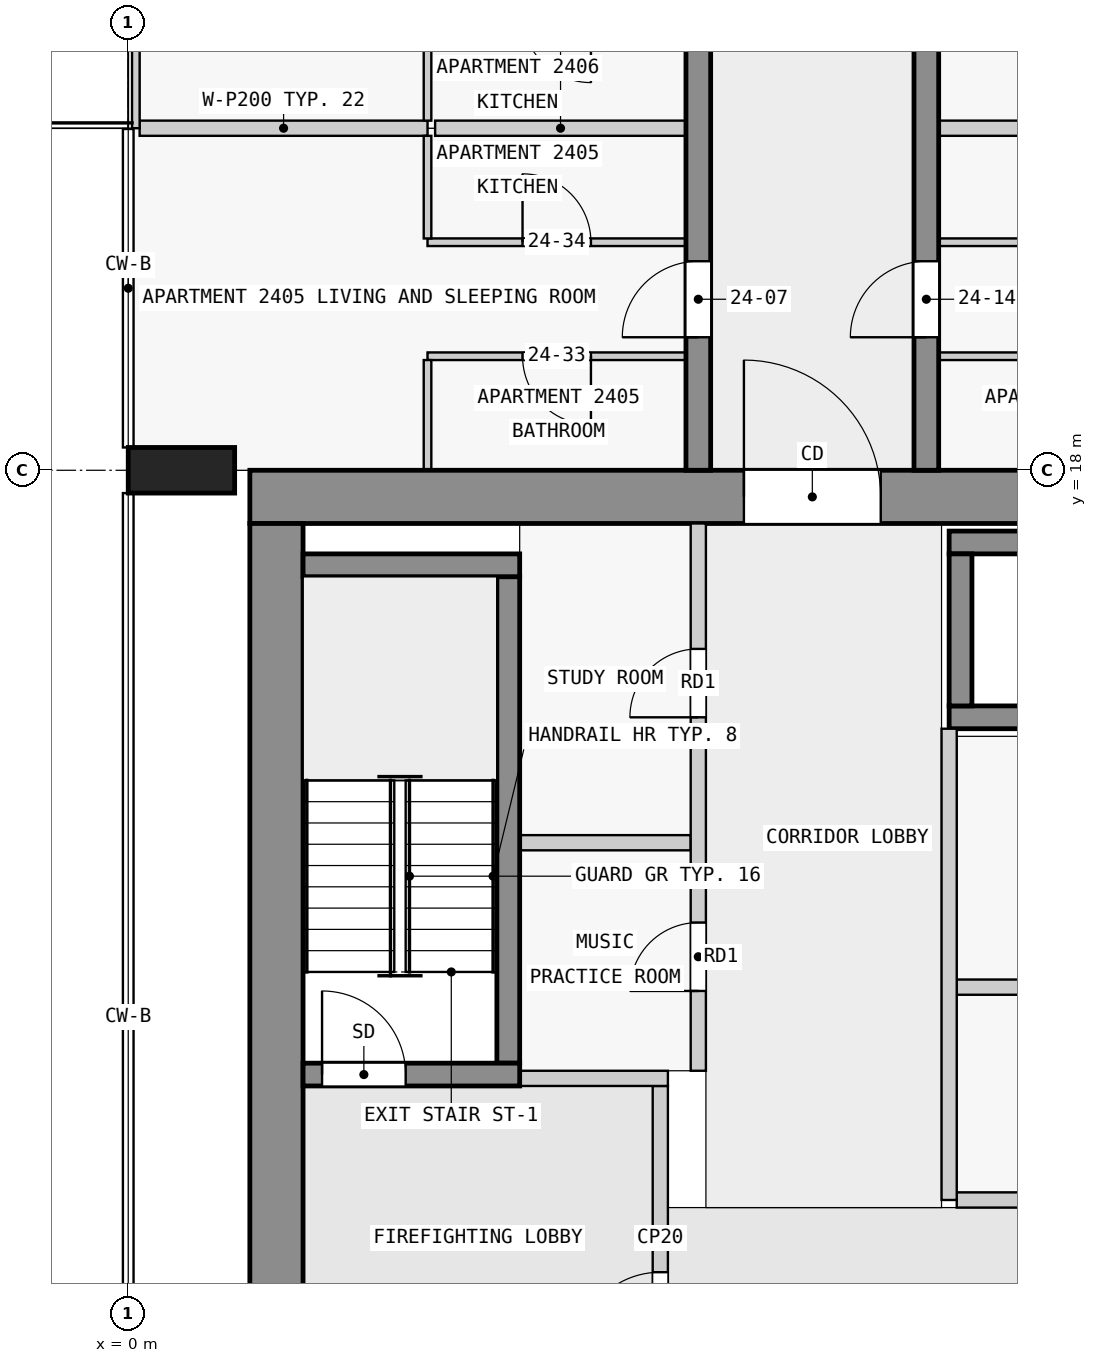
"""IFC4 building model, lengths in metres.
Left out: names, types, materials, properties, quantities, classifications, styles, units other than length and angle.
Written with IfcOpenShell. Run it as: python <this file> out.ifc"""

import sys

from ifc_helpers import new_model, si_unit, direction, frame, frame_2d, origin, origin_2d, place, context, subcontext, project, spatial, rectangle, extrude, element, fill, save


model = new_model("IFC4")
c1 = context("Model", 3, precision=1e-05, world=origin(), true_north=direction((0.0, 1.0)))
c2 = subcontext(c1, "Body", "Model", "MODEL_VIEW")
j1 = project(units=[si_unit("LENGTHUNIT", "METRE"), si_unit("PLANEANGLEUNIT", "RADIAN")], contexts=[c1])
p1 = place(None, origin())
s1 = spatial("IfcSite", under=j1, at=p1, CompositionType="ELEMENT")
p2 = place(p1, origin())
s2 = spatial("IfcBuilding", under=s1, at=p2, CompositionType="ELEMENT")
p3 = place(p2, frame((0.0, 0.0, 95.8)))
s3 = spatial("IfcBuildingStorey", under=s2, at=p3, CompositionType="ELEMENT", Elevation=95.8)
p4 = place(p3, frame((0.7, 18.0, 0.0), z_axis=(0.0, 0.0, 1.0), x_axis=(0.0, 1.0, 0.0)))
e1 = element("IfcColumn", 1, at=p4, inside=s3, PredefinedType="COLUMN", context=c2, shape_type="SweptSolid", body=[
    extrude(rectangle(XDim=0.6, YDim=1.4, at=origin_2d()), origin(), (0.0, 0.0, 1.0), 3.5),
])
p5 = place(p3, frame((1.6, 17.65, 0.0), z_axis=(0.0, 0.0, 1.0), x_axis=(1.0, 0.0, 0.0)))
e2 = element("IfcWall", 2, at=p5, inside=s3, PredefinedType="SHEAR", context=c2, shape_type="SweptSolid", body=[
    extrude(rectangle(XDim=20.9, YDim=0.7, at=frame_2d((10.45, 0.0))), origin(), (0.0, 0.0, 1.0), 3.25),
])
p6 = place(p5, frame((6.5, 0.0, 0.0)))
e3 = element("IfcOpeningElement", 3, at=p6, cuts=e2, PredefinedType="OPENING", context=c2, shape_type="SweptSolid", body=[
    extrude(rectangle(XDim=1.8, YDim=2.1, at=frame_2d((0.9, 1.05))), frame((0.0, 0.36, 0.0), z_axis=(0.0, -1.0, 0.0), x_axis=(1.0, 0.0, 0.0)), (0.0, 0.0, 1.0), 0.72),
])
p7 = place(p3, frame((1.95, 2.5, 0.0), z_axis=(0.0, 0.0, 1.0), x_axis=(0.0, 1.0, 0.0)))
e4 = element("IfcWall", 4, at=p7, inside=s3, PredefinedType="SHEAR", context=c2, shape_type="SweptSolid", body=[
    extrude(rectangle(XDim=14.8, YDim=0.7, at=frame_2d((7.4, 0.0))), origin(), (0.0, 0.0, 1.0), 3.25),
])
p8 = place(p3, frame((2.3, 10.05, 0.0), z_axis=(0.0, 0.0, 1.0), x_axis=(1.0, 0.0, 0.0)))
e5 = element("IfcWall", 5, at=p8, inside=s3, PredefinedType="SHEAR", context=c2, shape_type="SweptSolid", body=[
    extrude(rectangle(XDim=2.85, YDim=0.3, at=frame_2d((1.425, 0.0))), origin(), (0.0, 0.0, 1.0), 3.25),
])
p9 = place(p8, frame((0.25, 0.0, 0.0)))
e6 = element("IfcOpeningElement", 6, at=p9, cuts=e5, PredefinedType="OPENING", context=c2, shape_type="SweptSolid", body=[
    extrude(rectangle(XDim=1.1, YDim=2.1, at=frame_2d((0.55, 1.05))), frame((0.0, 0.16, 0.0), z_axis=(0.0, -1.0, 0.0), x_axis=(1.0, 0.0, 0.0)), (0.0, 0.0, 1.0), 0.32),
])
p10 = place(p3, frame((5.0, 10.2, 0.0), z_axis=(0.0, 0.0, 1.0), x_axis=(0.0, 1.0, 0.0)))
e7 = element("IfcWall", 7, at=p10, inside=s3, PredefinedType="SHEAR", context=c2, shape_type="SweptSolid", body=[
    extrude(rectangle(XDim=6.4, YDim=0.3, at=frame_2d((3.2, 0.0))), origin(), (0.0, 0.0, 1.0), 3.25),
])
p11 = place(p3, frame((2.3, 16.75, 0.0), z_axis=(0.0, 0.0, 1.0), x_axis=(1.0, 0.0, 0.0)))
e8 = element("IfcWall", 8, at=p11, inside=s3, PredefinedType="SHEAR", context=c2, shape_type="SweptSolid", body=[
    extrude(rectangle(XDim=2.85, YDim=0.3, at=frame_2d((1.425, 0.0))), origin(), (0.0, 0.0, 1.0), 3.25),
])
for number, where, z_axis, x_axis in (
    (9, (10.8, 17.05, 0.0), (0.0, 0.0, 1.0), (1.0, 0.0, 0.0)),
    (10, (10.8, 14.75, 0.0), (0.0, 0.0, 1.0), (1.0, 0.0, 0.0)),
):
    element("IfcWall", number, at=place(p3, frame(where, z_axis=z_axis, x_axis=x_axis)), inside=s3, PredefinedType="SHEAR", context=c2, shape_type="SweptSolid", body=[
        extrude(rectangle(XDim=7.8, YDim=0.3, at=frame_2d((3.9, 0.0))), origin(), (0.0, 0.0, 1.0), 3.25),
    ])
p12 = place(p3, frame((10.95, 14.9, 0.0), z_axis=(0.0, 0.0, 1.0), x_axis=(0.0, 1.0, 0.0)))
e11 = element("IfcWall", 11, at=p12, inside=s3, PredefinedType="SHEAR", context=c2, shape_type="SweptSolid", body=[
    extrude(rectangle(XDim=2.0, YDim=0.3, at=frame_2d((1.0, 0.0))), origin(), (0.0, 0.0, 1.0), 3.25),
])
p13 = place(p3, frame((7.5, 18.0, 0.0), z_axis=(0.0, 0.0, 1.0), x_axis=(0.0, 1.0, 0.0)))
e12 = element("IfcWall", 12, at=p13, inside=s3, PredefinedType="SHEAR", context=c2, shape_type="SweptSolid", body=[
    extrude(rectangle(XDim=27.0, YDim=0.325, at=frame_2d((13.5, 0.0))), origin(), (0.0, 0.0, 1.0), 3.25),
])
p14 = place(p13, frame((1.75, 0.0, 0.0)))
e13 = element("IfcOpeningElement", 13, at=p14, cuts=e12, PredefinedType="OPENING", context=c2, shape_type="SweptSolid", body=[
    extrude(rectangle(XDim=1.0, YDim=2.1, at=frame_2d((0.5, 1.05))), frame((0.0, 0.172, 0.0), z_axis=(0.0, -1.0, 0.0), x_axis=(1.0, 0.0, 0.0)), (0.0, 0.0, 1.0), 0.345),
])
p15 = place(p13, frame((6.25, 0.0, 0.0)))
e14 = element("IfcOpeningElement", 14, at=p15, cuts=e12, PredefinedType="OPENING", context=c2, shape_type="SweptSolid", body=[
    extrude(rectangle(XDim=1.0, YDim=2.1, at=frame_2d((0.5, 1.05))), frame((0.0, 0.172, 0.0), z_axis=(0.0, -1.0, 0.0), x_axis=(1.0, 0.0, 0.0)), (0.0, 0.0, 1.0), 0.345),
])
p16 = place(p13, frame((10.85, 0.0, 0.0)))
e15 = element("IfcOpeningElement", 15, at=p16, cuts=e12, PredefinedType="OPENING", context=c2, shape_type="SweptSolid", body=[
    extrude(rectangle(XDim=0.9, YDim=2.1, at=frame_2d((0.45, 1.05))), frame((0.0, 0.172, 0.0), z_axis=(0.0, -1.0, 0.0), x_axis=(1.0, 0.0, 0.0)), (0.0, 0.0, 1.0), 0.345),
])
p17 = place(p13, frame((15.25, 0.0, 0.0)))
e16 = element("IfcOpeningElement", 16, at=p17, cuts=e12, PredefinedType="OPENING", context=c2, shape_type="SweptSolid", body=[
    extrude(rectangle(XDim=1.0, YDim=2.1, at=frame_2d((0.5, 1.05))), frame((0.0, 0.172, 0.0), z_axis=(0.0, -1.0, 0.0), x_axis=(1.0, 0.0, 0.0)), (0.0, 0.0, 1.0), 0.345),
])
p18 = place(p13, frame((19.85, 0.0, 0.0)))
e17 = element("IfcOpeningElement", 17, at=p18, cuts=e12, PredefinedType="OPENING", context=c2, shape_type="SweptSolid", body=[
    extrude(rectangle(XDim=0.9, YDim=2.1, at=frame_2d((0.45, 1.05))), frame((0.0, 0.172, 0.0), z_axis=(0.0, -1.0, 0.0), x_axis=(1.0, 0.0, 0.0)), (0.0, 0.0, 1.0), 0.345),
])
p19 = place(p13, frame((23.25, 0.0, 0.0)))
e18 = element("IfcOpeningElement", 18, at=p19, cuts=e12, PredefinedType="OPENING", context=c2, shape_type="SweptSolid", body=[
    extrude(rectangle(XDim=0.9, YDim=2.1, at=frame_2d((0.45, 1.05))), frame((0.0, 0.172, 0.0), z_axis=(0.0, -1.0, 0.0), x_axis=(1.0, 0.0, 0.0)), (0.0, 0.0, 1.0), 0.345),
])
p20 = place(p13, frame((25.45, 0.0, 0.0)))
e19 = element("IfcOpeningElement", 19, at=p20, cuts=e12, PredefinedType="OPENING", context=c2, shape_type="SweptSolid", body=[
    extrude(rectangle(XDim=1.0, YDim=2.1, at=frame_2d((0.5, 1.05))), frame((0.0, 0.172, 0.0), z_axis=(0.0, -1.0, 0.0), x_axis=(1.0, 0.0, 0.0)), (0.0, 0.0, 1.0), 0.345),
])
p21 = place(p3, frame((10.5, 18.0, 0.0), z_axis=(0.0, 0.0, 1.0), x_axis=(0.0, 1.0, 0.0)))
e20 = element("IfcWall", 20, at=p21, inside=s3, PredefinedType="SHEAR", context=c2, shape_type="SweptSolid", body=[
    extrude(rectangle(XDim=27.0, YDim=0.325, at=frame_2d((13.5, 0.0))), origin(), (0.0, 0.0, 1.0), 3.25),
])
p22 = place(p21, frame((1.75, 0.0, 0.0)))
e21 = element("IfcOpeningElement", 21, at=p22, cuts=e20, PredefinedType="OPENING", context=c2, shape_type="SweptSolid", body=[
    extrude(rectangle(XDim=1.0, YDim=2.1, at=frame_2d((0.5, 1.05))), frame((0.0, 0.172, 0.0), z_axis=(0.0, -1.0, 0.0), x_axis=(1.0, 0.0, 0.0)), (0.0, 0.0, 1.0), 0.345),
])
p23 = place(p21, frame((6.25, 0.0, 0.0)))
e22 = element("IfcOpeningElement", 22, at=p23, cuts=e20, PredefinedType="OPENING", context=c2, shape_type="SweptSolid", body=[
    extrude(rectangle(XDim=1.0, YDim=2.1, at=frame_2d((0.5, 1.05))), frame((0.0, 0.172, 0.0), z_axis=(0.0, -1.0, 0.0), x_axis=(1.0, 0.0, 0.0)), (0.0, 0.0, 1.0), 0.345),
])
p24 = place(p21, frame((13.05, 0.0, 0.0)))
e23 = element("IfcOpeningElement", 23, at=p24, cuts=e20, PredefinedType="OPENING", context=c2, shape_type="SweptSolid", body=[
    extrude(rectangle(XDim=1.0, YDim=2.1, at=frame_2d((0.5, 1.05))), frame((0.0, 0.172, 0.0), z_axis=(0.0, -1.0, 0.0), x_axis=(1.0, 0.0, 0.0)), (0.0, 0.0, 1.0), 0.345),
])
p25 = place(p21, frame((21.35, 0.0, 0.0)))
e24 = element("IfcOpeningElement", 24, at=p25, cuts=e20, PredefinedType="OPENING", context=c2, shape_type="SweptSolid", body=[
    extrude(rectangle(XDim=1.0, YDim=2.1, at=frame_2d((0.5, 1.05))), frame((0.0, 0.172, 0.0), z_axis=(0.0, -1.0, 0.0), x_axis=(1.0, 0.0, 0.0)), (0.0, 0.0, 1.0), 0.345),
])
p26 = place(p3, frame((0.1, 22.5, 0.0), z_axis=(0.0, 0.0, 1.0), x_axis=(0.0, 1.0, 0.0)))
e25 = element("IfcWall", 25, at=p26, inside=s3, PredefinedType="STANDARD", context=c2, shape_type="SweptSolid", body=[
    extrude(rectangle(XDim=4.5, YDim=0.1, at=frame_2d((2.25, 0.0))), origin(), (0.0, 0.0, 1.0), 3.25),
])
p27 = place(p26, frame((1.05, 0.0, 0.0)))
e26 = element("IfcOpeningElement", 26, at=p27, cuts=e25, PredefinedType="OPENING", context=c2, shape_type="SweptSolid", body=[
    extrude(rectangle(XDim=2.4, YDim=2.4, at=frame_2d((1.2, 1.2))), frame((0.0, 0.06, 0.0), z_axis=(0.0, -1.0, 0.0), x_axis=(1.0, 0.0, 0.0)), (0.0, 0.0, 1.0), 0.12),
])
p28 = place(p3, frame((7.0, 5.9, 0.0), z_axis=(0.0, 0.0, 1.0), x_axis=(0.0, 1.0, 0.0)))
e27 = element("IfcWall", 27, at=p28, inside=s3, PredefinedType="PARTITIONING", context=c2, shape_type="SweptSolid", body=[
    extrude(rectangle(XDim=4.0, YDim=0.2, at=frame_2d((2.0, 0.0))), origin(), (0.0, 0.0, 1.0), 3.25),
])
p29 = place(p28, frame((0.45, 0.0, 0.0)))
e28 = element("IfcOpeningElement", 28, at=p29, cuts=e27, PredefinedType="OPENING", context=c2, shape_type="SweptSolid", body=[
    extrude(rectangle(XDim=1.1, YDim=2.1, at=frame_2d((0.55, 1.05))), frame((0.0, 0.11, 0.0), z_axis=(0.0, -1.0, 0.0), x_axis=(1.0, 0.0, 0.0)), (0.0, 0.0, 1.0), 0.22),
])
p30 = place(p3, frame((5.15, 10.0, 0.0), z_axis=(0.0, 0.0, 1.0), x_axis=(1.0, 0.0, 0.0)))
e29 = element("IfcWall", 29, at=p30, inside=s3, PredefinedType="PARTITIONING", context=c2, shape_type="SweptSolid", body=[
    extrude(rectangle(XDim=1.95, YDim=0.2, at=frame_2d((0.975, 0.0))), origin(), (0.0, 0.0, 1.0), 3.25),
])
p31 = place(p3, frame((10.8, 8.4, 0.0), z_axis=(0.0, 0.0, 1.0), x_axis=(0.0, 1.0, 0.0)))
e30 = element("IfcWall", 30, at=p31, inside=s3, PredefinedType="PARTITIONING", context=c2, shape_type="SweptSolid", body=[
    extrude(rectangle(XDim=6.2, YDim=0.2, at=frame_2d((3.1, 0.0))), origin(), (0.0, 0.0, 1.0), 3.25),
])
for number, where, z_axis, x_axis in (
    (31, (10.9, 8.4, 0.0), (0.0, 0.0, 1.0), (1.0, 0.0, 0.0)),
    (32, (10.9, 11.2, 0.0), (0.0, 0.0, 1.0), (1.0, 0.0, 0.0)),
):
    element("IfcWall", number, at=place(p3, frame(where, z_axis=z_axis, x_axis=x_axis)), inside=s3, PredefinedType="PARTITIONING", context=c2, shape_type="SweptSolid", body=[
        extrude(rectangle(XDim=7.4, YDim=0.2, at=frame_2d((3.7, 0.0))), origin(), (0.0, 0.0, 1.0), 3.25),
    ])
p32 = place(p3, frame((7.5, 10.1, 0.0), z_axis=(0.0, 0.0, 1.0), x_axis=(0.0, 1.0, 0.0)))
e33 = element("IfcWall", 33, at=p32, inside=s3, PredefinedType="PARTITIONING", context=c2, shape_type="SweptSolid", body=[
    extrude(rectangle(XDim=7.2, YDim=0.2, at=frame_2d((3.6, 0.0))), origin(), (0.0, 0.0, 1.0), 3.25),
])
p33 = place(p32, frame((1.05, 0.0, 0.0)))
e34 = element("IfcOpeningElement", 34, at=p33, cuts=e33, PredefinedType="OPENING", context=c2, shape_type="SweptSolid", body=[
    extrude(rectangle(XDim=0.9, YDim=2.1, at=frame_2d((0.45, 1.05))), frame((0.0, 0.11, 0.0), z_axis=(0.0, -1.0, 0.0), x_axis=(1.0, 0.0, 0.0)), (0.0, 0.0, 1.0), 0.22),
])
p34 = place(p32, frame((4.65, 0.0, 0.0)))
e35 = element("IfcOpeningElement", 35, at=p34, cuts=e33, PredefinedType="OPENING", context=c2, shape_type="SweptSolid", body=[
    extrude(rectangle(XDim=0.9, YDim=2.1, at=frame_2d((0.45, 1.05))), frame((0.0, 0.11, 0.0), z_axis=(0.0, -1.0, 0.0), x_axis=(1.0, 0.0, 0.0)), (0.0, 0.0, 1.0), 0.22),
])
p35 = place(p3, frame((5.15, 13.1, 0.0), z_axis=(0.0, 0.0, 1.0), x_axis=(1.0, 0.0, 0.0)))
e36 = element("IfcWall", 36, at=p35, inside=s3, PredefinedType="PARTITIONING", context=c2, shape_type="SweptSolid", body=[
    extrude(rectangle(XDim=2.25, YDim=0.2, at=frame_2d((1.125, 0.0))), origin(), (0.0, 0.0, 1.0), 3.25),
])
p36 = place(p3, frame((7.337, 19.5, 0.0), z_axis=(0.0, 0.0, 1.0), x_axis=(-1.0, 0.0, 0.0)))
e37 = element("IfcWall", 37, at=p36, inside=s3, PredefinedType="PARTITIONING", context=c2, shape_type="SweptSolid", body=[
    extrude(rectangle(XDim=3.4, YDim=0.1, at=frame_2d((1.7, 0.0))), origin(), (0.0, 0.0, 1.0), 3.25),
])
p37 = place(p36, frame((1.25, 0.0, 0.0)))
e38 = element("IfcOpeningElement", 38, at=p37, cuts=e37, PredefinedType="OPENING", context=c2, shape_type="SweptSolid", body=[
    extrude(rectangle(XDim=0.9, YDim=2.1, at=frame_2d((0.45, 1.05))), frame((0.0, 0.06, 0.0), z_axis=(0.0, -1.0, 0.0), x_axis=(1.0, 0.0, 0.0)), (0.0, 0.0, 1.0), 0.12),
])
p38 = place(p3, frame((14.062, 19.5, 0.0), z_axis=(0.0, 0.0, 1.0), x_axis=(-1.0, 0.0, 0.0)))
e39 = element("IfcWall", 39, at=p38, inside=s3, PredefinedType="PARTITIONING", context=c2, shape_type="SweptSolid", body=[
    extrude(rectangle(XDim=3.4, YDim=0.1, at=frame_2d((1.7, 0.0))), origin(), (0.0, 0.0, 1.0), 3.25),
])
p39 = place(p38, frame((1.25, 0.0, 0.0)))
e40 = element("IfcOpeningElement", 40, at=p39, cuts=e39, PredefinedType="OPENING", context=c2, shape_type="SweptSolid", body=[
    extrude(rectangle(XDim=0.9, YDim=2.1, at=frame_2d((0.45, 1.05))), frame((0.0, 0.06, 0.0), z_axis=(0.0, -1.0, 0.0), x_axis=(1.0, 0.0, 0.0)), (0.0, 0.0, 1.0), 0.12),
])
p40 = place(p3, frame((3.938, 21.0, 0.0), z_axis=(0.0, 0.0, 1.0), x_axis=(1.0, 0.0, 0.0)))
e41 = element("IfcWall", 41, at=p40, inside=s3, PredefinedType="PARTITIONING", context=c2, shape_type="SweptSolid", body=[
    extrude(rectangle(XDim=3.4, YDim=0.1, at=frame_2d((1.7, 0.0))), origin(), (0.0, 0.0, 1.0), 3.25),
])
p41 = place(p40, frame((1.25, 0.0, 0.0)))
e42 = element("IfcOpeningElement", 42, at=p41, cuts=e41, PredefinedType="OPENING", context=c2, shape_type="SweptSolid", body=[
    extrude(rectangle(XDim=0.9, YDim=2.1, at=frame_2d((0.45, 1.05))), frame((0.0, 0.06, 0.0), z_axis=(0.0, -1.0, 0.0), x_axis=(1.0, 0.0, 0.0)), (0.0, 0.0, 1.0), 0.12),
])
p42 = place(p3, frame((10.663, 21.0, 0.0), z_axis=(0.0, 0.0, 1.0), x_axis=(1.0, 0.0, 0.0)))
e43 = element("IfcWall", 43, at=p42, inside=s3, PredefinedType="PARTITIONING", context=c2, shape_type="SweptSolid", body=[
    extrude(rectangle(XDim=3.4, YDim=0.1, at=frame_2d((1.7, 0.0))), origin(), (0.0, 0.0, 1.0), 3.25),
])
p43 = place(p42, frame((1.25, 0.0, 0.0)))
e44 = element("IfcOpeningElement", 44, at=p43, cuts=e43, PredefinedType="OPENING", context=c2, shape_type="SweptSolid", body=[
    extrude(rectangle(XDim=0.9, YDim=2.1, at=frame_2d((0.45, 1.05))), frame((0.0, 0.06, 0.0), z_axis=(0.0, -1.0, 0.0), x_axis=(1.0, 0.0, 0.0)), (0.0, 0.0, 1.0), 0.12),
])
for number, where, z_axis, x_axis in (
    (45, (7.337, 22.5, 0.0), (0.0, 0.0, 1.0), (-1.0, 0.0, 0.0)),
    (46, (13.962, 22.5, 0.0), (0.0, 0.0, 1.0), (-1.0, 0.0, 0.0)),
):
    element("IfcWall", number, at=place(p3, frame(where, z_axis=z_axis, x_axis=x_axis)), inside=s3, PredefinedType="PARTITIONING", context=c2, shape_type="SweptSolid", body=[
        extrude(rectangle(XDim=3.3, YDim=0.2, at=frame_2d((1.65, 0.0))), origin(), (0.0, 0.0, 1.0), 3.25),
    ])
p44 = place(p3, frame((0.15, 22.5, 0.0), z_axis=(0.0, 0.0, 1.0), x_axis=(1.0, 0.0, 0.0)))
e47 = element("IfcWall", 47, at=p44, inside=s3, PredefinedType="PARTITIONING", context=c2, shape_type="SweptSolid", body=[
    extrude(rectangle(XDim=3.788, YDim=0.2, at=frame_2d((1.894, 0.0))), origin(), (0.0, 0.0, 1.0), 3.25),
])
p45 = place(p3, frame((3.938, 19.45, 0.0), z_axis=(0.0, 0.0, 1.0), x_axis=(0.0, -1.0, 0.0)))
e48 = element("IfcWall", 48, at=p45, inside=s3, PredefinedType="PARTITIONING", context=c2, shape_type="SweptSolid", body=[
    extrude(rectangle(XDim=1.45, YDim=0.1, at=frame_2d((0.725, 0.0))), origin(), (0.0, 0.0, 1.0), 3.25),
])
for number, where, z_axis, x_axis in (
    (49, (3.938, 22.4, 0.0), (0.0, 0.0, 1.0), (0.0, -1.0, 0.0)),
    (50, (3.938, 23.95, 0.0), (0.0, 0.0, 1.0), (0.0, -1.0, 0.0)),
):
    element("IfcWall", number, at=place(p3, frame(where, z_axis=z_axis, x_axis=x_axis)), inside=s3, PredefinedType="PARTITIONING", context=c2, shape_type="SweptSolid", body=[
        extrude(rectangle(XDim=1.35, YDim=0.1, at=frame_2d((0.675, 0.0))), origin(), (0.0, 0.0, 1.0), 3.25),
    ])
p46 = place(p29, origin())
e51 = element("IfcDoor", 51, at=p46, inside=s3, OperationType="SINGLE_SWING_LEFT", PredefinedType="DOOR", context=c2, shape_type="SweptSolid", body=[
    extrude(rectangle(XDim=1.1, YDim=2.1, at=frame_2d((0.55, 1.05))), frame((0.0, 0.025, 0.0), z_axis=(0.0, -1.0, 0.0), x_axis=(1.0, 0.0, 0.0)), (0.0, 0.0, 1.0), 0.05),
])
fill(e28, e51)
p47 = place(p9, origin())
e52 = element("IfcDoor", 52, at=p47, inside=s3, OperationType="SINGLE_SWING_RIGHT", PredefinedType="DOOR", context=c2, shape_type="SweptSolid", body=[
    extrude(rectangle(XDim=1.1, YDim=2.1, at=frame_2d((0.55, 1.05))), frame((0.0, 0.025, 0.0), z_axis=(0.0, -1.0, 0.0), x_axis=(1.0, 0.0, 0.0)), (0.0, 0.0, 1.0), 0.05),
])
fill(e6, e52)
p48 = place(p6, origin())
e53 = element("IfcDoor", 53, at=p48, inside=s3, OperationType="DOUBLE_DOOR_SINGLE_SWING", PredefinedType="DOOR", context=c2, shape_type="SweptSolid", body=[
    extrude(rectangle(XDim=1.8, YDim=2.1, at=frame_2d((0.9, 1.05))), frame((0.0, 0.025, 0.0), z_axis=(0.0, -1.0, 0.0), x_axis=(1.0, 0.0, 0.0)), (0.0, 0.0, 1.0), 0.05),
])
fill(e3, e53)
p49 = place(p33, origin())
e54 = element("IfcDoor", 54, at=p49, inside=s3, OperationType="SINGLE_SWING_RIGHT", PredefinedType="DOOR", context=c2, shape_type="SweptSolid", body=[
    extrude(rectangle(XDim=0.9, YDim=2.1, at=frame_2d((0.45, 1.05))), frame((0.0, 0.025, 0.0), z_axis=(0.0, -1.0, 0.0), x_axis=(1.0, 0.0, 0.0)), (0.0, 0.0, 1.0), 0.05),
])
fill(e34, e54)
p50 = place(p34, origin())
e55 = element("IfcDoor", 55, at=p50, inside=s3, OperationType="SINGLE_SWING_RIGHT", PredefinedType="DOOR", context=c2, shape_type="SweptSolid", body=[
    extrude(rectangle(XDim=0.9, YDim=2.1, at=frame_2d((0.45, 1.05))), frame((0.0, 0.025, 0.0), z_axis=(0.0, -1.0, 0.0), x_axis=(1.0, 0.0, 0.0)), (0.0, 0.0, 1.0), 0.05),
])
fill(e35, e55)
p51 = place(p14, origin())
e56 = element("IfcDoor", 56, at=p51, inside=s3, OperationType="SINGLE_SWING_LEFT", PredefinedType="DOOR", context=c2, shape_type="SweptSolid", body=[
    extrude(rectangle(XDim=1.0, YDim=2.1, at=frame_2d((0.5, 1.05))), frame((0.0, 0.025, 0.0), z_axis=(0.0, -1.0, 0.0), x_axis=(1.0, 0.0, 0.0)), (0.0, 0.0, 1.0), 0.05),
])
fill(e13, e56)
p52 = place(p22, origin())
e57 = element("IfcDoor", 57, at=p52, inside=s3, OperationType="SINGLE_SWING_LEFT", PredefinedType="DOOR", context=c2, shape_type="SweptSolid", body=[
    extrude(rectangle(XDim=1.0, YDim=2.1, at=frame_2d((0.5, 1.05))), frame((0.0, 0.025, 0.0), z_axis=(0.0, -1.0, 0.0), x_axis=(1.0, 0.0, 0.0)), (0.0, 0.0, 1.0), 0.05),
])
fill(e21, e57)
p53 = place(p37, origin())
e58 = element("IfcDoor", 58, at=p53, inside=s3, OperationType="SINGLE_SWING_LEFT", PredefinedType="DOOR", context=c2, shape_type="SweptSolid", body=[
    extrude(rectangle(XDim=0.9, YDim=2.1, at=frame_2d((0.45, 1.05))), frame((0.0, 0.025, 0.0), z_axis=(0.0, -1.0, 0.0), x_axis=(1.0, 0.0, 0.0)), (0.0, 0.0, 1.0), 0.05),
])
fill(e38, e58)
p54 = place(p41, origin())
e59 = element("IfcDoor", 59, at=p54, inside=s3, OperationType="SINGLE_SWING_LEFT", PredefinedType="DOOR", context=c2, shape_type="SweptSolid", body=[
    extrude(rectangle(XDim=0.9, YDim=2.1, at=frame_2d((0.45, 1.05))), frame((0.0, 0.025, 0.0), z_axis=(0.0, -1.0, 0.0), x_axis=(1.0, 0.0, 0.0)), (0.0, 0.0, 1.0), 0.05),
])
fill(e42, e59)
save(model, sys.argv[1])
